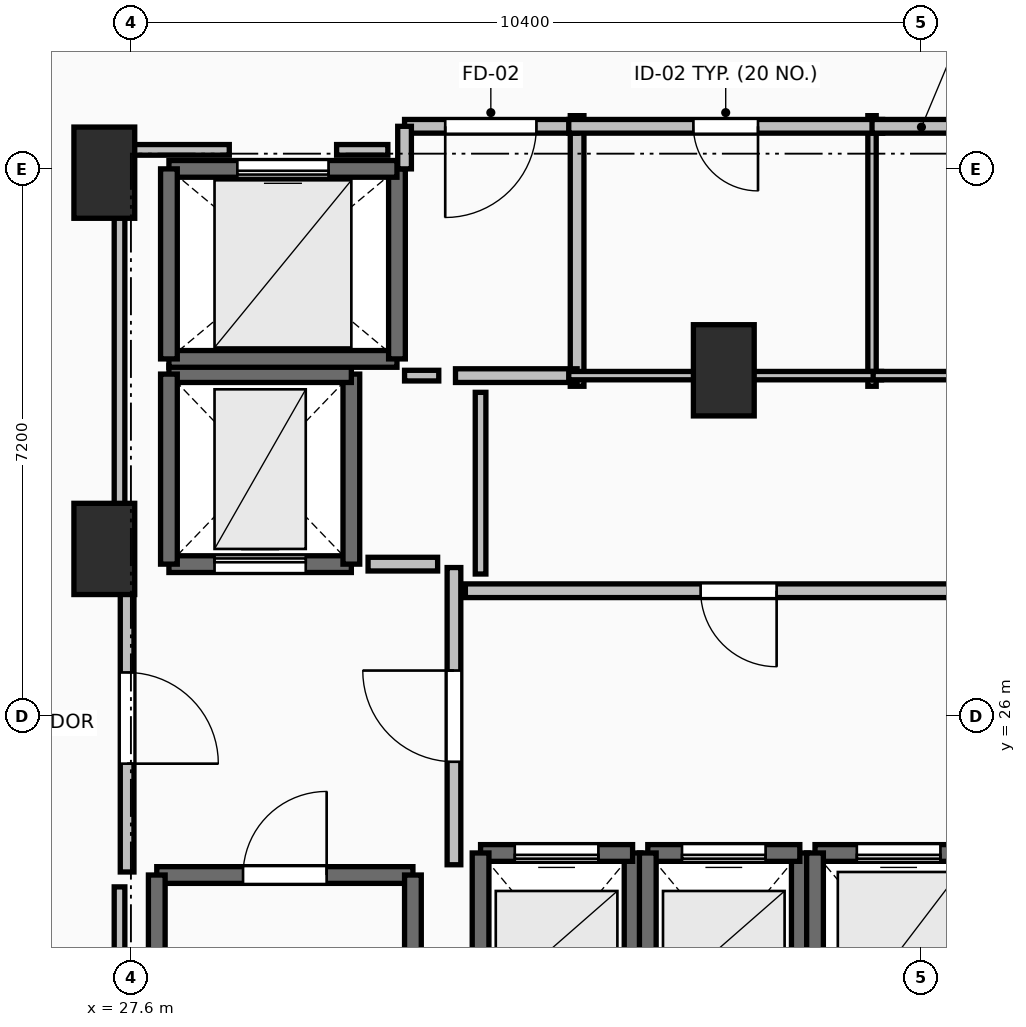
"""IFC4 building model, lengths in metres.
Left out: names, types, materials, properties, quantities, classifications, styles, units other than length and angle.
Written with IfcOpenShell. Run it as: python <this file> out.ifc"""

import sys

from ifc_helpers import new_model, si_unit, direction, frame, frame_2d, origin, origin_2d, place, context, subcontext, project, spatial, rectangle, extrude, element, fill, save


model = new_model("IFC4")
c1 = context("Model", 3, precision=1e-05, world=origin(), true_north=direction((0.0, 1.0)))
c2 = subcontext(c1, "Body", "Model", "MODEL_VIEW")
j1 = project(units=[si_unit("LENGTHUNIT", "METRE"), si_unit("PLANEANGLEUNIT", "RADIAN")], contexts=[c1])
p1 = place(None, origin())
s1 = spatial("IfcSite", under=j1, at=p1, CompositionType="ELEMENT")
p2 = place(p1, origin())
s2 = spatial("IfcBuilding", under=s1, at=p2, CompositionType="ELEMENT")
p3 = place(p2, frame((0.0, 0.0, 150.1)))
s3 = spatial("IfcBuildingStorey", under=s2, at=p3, CompositionType="ELEMENT", Elevation=150.1)
for number, where, z_axis, x_axis in (
    (1, (27.25, 28.2, 0.0), (0.0, 0.0, 1.0), (1.0, 0.0, 0.0)),
    (2, (27.25, 33.15, 0.0), (0.0, 0.0, 1.0), (1.0, 0.0, 0.0)),
    (3, (35.4, 30.55, 0.0), (0.0, 0.0, 1.0), (1.0, 0.0, 0.0)),
):
    element("IfcColumn", number, at=place(p3, frame(where, z_axis=z_axis, x_axis=x_axis)), inside=s3, PredefinedType="PILASTER", context=c2, shape_type="SweptSolid", body=[
        extrude(rectangle(XDim=0.8, YDim=1.2, at=origin_2d()), origin(), (0.0, 0.0, 1.0), 3.5),
    ])
p4 = place(p3, frame((27.94, 23.91, 0.0), z_axis=(0.0, 0.0, 1.0), x_axis=(1.0, 0.0, 0.0)))
e4 = element("IfcWall", 4, at=p4, inside=s3, PredefinedType="SOLIDWALL", context=c2, shape_type="SweptSolid", body=[
    extrude(rectangle(XDim=3.37, YDim=0.22, at=frame_2d((1.685, 0.0))), origin(), (0.0, 0.0, 1.0), 3.24),
])
p5 = place(p4, frame((1.135, 0.0, 0.0)))
e5 = element("IfcOpeningElement", 5, at=p5, cuts=e4, PredefinedType="OPENING", context=c2, shape_type="SweptSolid", body=[
    extrude(rectangle(XDim=1.1, YDim=2.15, at=frame_2d((0.55, 1.075))), frame((0.0, 0.125, 0.0), z_axis=(0.0, -1.0, 0.0), x_axis=(1.0, 0.0, 0.0)), (0.0, 0.0, 1.0), 0.25),
])
for number, where, z_axis, x_axis in (
    (6, (31.31, 23.91, 0.0), (0.0, 0.0, 1.0), (0.0, -1.0, 0.0)),
    (7, (27.94, 16.49, 0.0), (0.0, 0.0, 1.0), (0.0, 1.0, 0.0)),
):
    element("IfcWall", number, at=place(p3, frame(where, z_axis=z_axis, x_axis=x_axis)), inside=s3, PredefinedType="SOLIDWALL", context=c2, shape_type="SweptSolid", body=[
        extrude(rectangle(XDim=7.42, YDim=0.22, at=frame_2d((3.71, 0.0))), origin(), (0.0, 0.0, 1.0), 3.24),
    ])
p6 = place(p3, frame((34.2, 21.8, 0.0), z_axis=(0.0, 0.0, 1.0), x_axis=(0.0, 1.0, 0.0)))
e8 = element("IfcWall", 8, at=p6, inside=s3, PredefinedType="SOLIDWALL", context=c2, shape_type="SweptSolid", body=[
    extrude(rectangle(XDim=2.4, YDim=0.22, at=frame_2d((1.2, 0.0))), origin(), (0.0, 0.0, 1.0), 3.24),
])
p7 = place(p3, frame((34.2, 24.2, 0.0), z_axis=(0.0, 0.0, 1.0), x_axis=(-1.0, 0.0, 0.0)))
e9 = element("IfcWall", 9, at=p7, inside=s3, PredefinedType="SOLIDWALL", context=c2, shape_type="SweptSolid", body=[
    extrude(rectangle(XDim=2.0, YDim=0.22, at=frame_2d((1.0, 0.0))), origin(), (0.0, 0.0, 1.0), 3.24),
])
p8 = place(p7, frame((0.45, 0.0, 0.0)))
e10 = element("IfcOpeningElement", 10, at=p8, cuts=e9, PredefinedType="OPENING", context=c2, shape_type="SweptSolid", body=[
    extrude(rectangle(XDim=1.1, YDim=2.2, at=frame_2d((0.55, 1.1))), frame((0.0, 0.125, 0.0), z_axis=(0.0, -1.0, 0.0), x_axis=(1.0, 0.0, 0.0)), (0.0, 0.0, 1.0), 0.25),
])
for number, where, z_axis, x_axis in (
    (11, (32.2, 24.2, 0.0), (0.0, 0.0, 1.0), (0.0, -1.0, 0.0)),
    (12, (36.4, 21.8, 0.0), (0.0, 0.0, 1.0), (0.0, 1.0, 0.0)),
):
    element("IfcWall", number, at=place(p3, frame(where, z_axis=z_axis, x_axis=x_axis)), inside=s3, PredefinedType="SOLIDWALL", context=c2, shape_type="SweptSolid", body=[
        extrude(rectangle(XDim=2.4, YDim=0.22, at=frame_2d((1.2, 0.0))), origin(), (0.0, 0.0, 1.0), 3.24),
    ])
p9 = place(p3, frame((36.4, 24.2, 0.0), z_axis=(0.0, 0.0, 1.0), x_axis=(-1.0, 0.0, 0.0)))
e13 = element("IfcWall", 13, at=p9, inside=s3, PredefinedType="SOLIDWALL", context=c2, shape_type="SweptSolid", body=[
    extrude(rectangle(XDim=2.0, YDim=0.22, at=frame_2d((1.0, 0.0))), origin(), (0.0, 0.0, 1.0), 3.24),
])
p10 = place(p9, frame((0.45, 0.0, 0.0)))
e14 = element("IfcOpeningElement", 14, at=p10, cuts=e13, PredefinedType="OPENING", context=c2, shape_type="SweptSolid", body=[
    extrude(rectangle(XDim=1.1, YDim=2.2, at=frame_2d((0.55, 1.1))), frame((0.0, 0.125, 0.0), z_axis=(0.0, -1.0, 0.0), x_axis=(1.0, 0.0, 0.0)), (0.0, 0.0, 1.0), 0.25),
])
p11 = place(p3, frame((34.4, 24.2, 0.0), z_axis=(0.0, 0.0, 1.0), x_axis=(0.0, -1.0, 0.0)))
e15 = element("IfcWall", 15, at=p11, inside=s3, PredefinedType="SOLIDWALL", context=c2, shape_type="SweptSolid", body=[
    extrude(rectangle(XDim=2.4, YDim=0.22, at=frame_2d((1.2, 0.0))), origin(), (0.0, 0.0, 1.0), 3.24),
])
p12 = place(p3, frame((38.8, 24.2, 0.0), z_axis=(0.0, 0.0, 1.0), x_axis=(-1.0, 0.0, 0.0)))
e16 = element("IfcWall", 16, at=p12, inside=s3, PredefinedType="SOLIDWALL", context=c2, shape_type="SweptSolid", body=[
    extrude(rectangle(XDim=2.2, YDim=0.22, at=frame_2d((1.1, 0.0))), origin(), (0.0, 0.0, 1.0), 3.24),
])
p13 = place(p12, frame((0.55, 0.0, 0.0)))
e17 = element("IfcOpeningElement", 17, at=p13, cuts=e16, PredefinedType="OPENING", context=c2, shape_type="SweptSolid", body=[
    extrude(rectangle(XDim=1.1, YDim=2.2, at=frame_2d((0.55, 1.1))), frame((0.0, 0.125, 0.0), z_axis=(0.0, -1.0, 0.0), x_axis=(1.0, 0.0, 0.0)), (0.0, 0.0, 1.0), 0.25),
])
p14 = place(p3, frame((36.6, 24.2, 0.0), z_axis=(0.0, 0.0, 1.0), x_axis=(0.0, -1.0, 0.0)))
e18 = element("IfcWall", 18, at=p14, inside=s3, PredefinedType="SOLIDWALL", context=c2, shape_type="SweptSolid", body=[
    extrude(rectangle(XDim=2.6, YDim=0.22, at=frame_2d((1.3, 0.0))), origin(), (0.0, 0.0, 1.0), 3.24),
])
p15 = place(p3, frame((28.1, 28.0, 0.0), z_axis=(0.0, 0.0, 1.0), x_axis=(1.0, 0.0, 0.0)))
e19 = element("IfcWall", 19, at=p15, inside=s3, PredefinedType="SHEAR", context=c2, shape_type="SweptSolid", body=[
    extrude(rectangle(XDim=2.4, YDim=0.22, at=frame_2d((1.2, 0.0))), origin(), (0.0, 0.0, 1.0), 3.24),
])
p16 = place(p15, frame((0.6, 0.0, 0.0)))
e20 = element("IfcOpeningElement", 20, at=p16, cuts=e19, PredefinedType="OPENING", context=c2, shape_type="SweptSolid", body=[
    extrude(rectangle(XDim=1.2, YDim=2.2, at=frame_2d((0.6, 1.1))), frame((0.0, 0.125, 0.0), z_axis=(0.0, -1.0, 0.0), x_axis=(1.0, 0.0, 0.0)), (0.0, 0.0, 1.0), 0.25),
])
p17 = place(p3, frame((30.5, 28.0, 0.0), z_axis=(0.0, 0.0, 1.0), x_axis=(0.0, 1.0, 0.0)))
e21 = element("IfcWall", 21, at=p17, inside=s3, PredefinedType="SHEAR", context=c2, shape_type="SweptSolid", body=[
    extrude(rectangle(XDim=2.5, YDim=0.22, at=frame_2d((1.25, 0.0))), origin(), (0.0, 0.0, 1.0), 3.24),
])
p18 = place(p3, frame((30.5, 30.5, 0.0), z_axis=(0.0, 0.0, 1.0), x_axis=(-1.0, 0.0, 0.0)))
e22 = element("IfcWall", 22, at=p18, inside=s3, PredefinedType="SHEAR", context=c2, shape_type="SweptSolid", body=[
    extrude(rectangle(XDim=2.4, YDim=0.22, at=frame_2d((1.2, 0.0))), origin(), (0.0, 0.0, 1.0), 3.24),
])
p19 = place(p3, frame((28.1, 30.5, 0.0), z_axis=(0.0, 0.0, 1.0), x_axis=(0.0, -1.0, 0.0)))
e23 = element("IfcWall", 23, at=p19, inside=s3, PredefinedType="SHEAR", context=c2, shape_type="SweptSolid", body=[
    extrude(rectangle(XDim=2.5, YDim=0.22, at=frame_2d((1.25, 0.0))), origin(), (0.0, 0.0, 1.0), 3.24),
])
p20 = place(p3, frame((28.1, 30.7, 0.0), z_axis=(0.0, 0.0, 1.0), x_axis=(1.0, 0.0, 0.0)))
e24 = element("IfcWall", 24, at=p20, inside=s3, PredefinedType="SOLIDWALL", context=c2, shape_type="SweptSolid", body=[
    extrude(rectangle(XDim=3.0, YDim=0.22, at=frame_2d((1.5, 0.0))), origin(), (0.0, 0.0, 1.0), 3.24),
])
p21 = place(p3, frame((31.1, 30.7, 0.0), z_axis=(0.0, 0.0, 1.0), x_axis=(0.0, 1.0, 0.0)))
e25 = element("IfcWall", 25, at=p21, inside=s3, PredefinedType="SOLIDWALL", context=c2, shape_type="SweptSolid", body=[
    extrude(rectangle(XDim=2.5, YDim=0.22, at=frame_2d((1.25, 0.0))), origin(), (0.0, 0.0, 1.0), 3.24),
])
p22 = place(p3, frame((31.1, 33.2, 0.0), z_axis=(0.0, 0.0, 1.0), x_axis=(-1.0, 0.0, 0.0)))
e26 = element("IfcWall", 26, at=p22, inside=s3, PredefinedType="SOLIDWALL", context=c2, shape_type="SweptSolid", body=[
    extrude(rectangle(XDim=3.0, YDim=0.22, at=frame_2d((1.5, 0.0))), origin(), (0.0, 0.0, 1.0), 3.24),
])
p23 = place(p22, frame((0.9, 0.0, 0.0)))
e27 = element("IfcOpeningElement", 27, at=p23, cuts=e26, PredefinedType="OPENING", context=c2, shape_type="SweptSolid", body=[
    extrude(rectangle(XDim=1.2, YDim=2.2, at=frame_2d((0.6, 1.1))), frame((0.0, 0.125, 0.0), z_axis=(0.0, -1.0, 0.0), x_axis=(1.0, 0.0, 0.0)), (0.0, 0.0, 1.0), 0.25),
])
p24 = place(p3, frame((28.1, 33.2, 0.0), z_axis=(0.0, 0.0, 1.0), x_axis=(0.0, -1.0, 0.0)))
e28 = element("IfcWall", 28, at=p24, inside=s3, PredefinedType="SOLIDWALL", context=c2, shape_type="SweptSolid", body=[
    extrude(rectangle(XDim=2.5, YDim=0.22, at=frame_2d((1.25, 0.0))), origin(), (0.0, 0.0, 1.0), 3.24),
])
p25 = place(p3, frame((31.85, 24.045, 0.0), z_axis=(0.0, 0.0, 1.0), x_axis=(0.0, 1.0, 0.0)))
e29 = element("IfcWall", 29, at=p25, inside=s3, PredefinedType="PARTITIONING", context=c2, shape_type="SweptSolid", body=[
    extrude(rectangle(XDim=3.91, YDim=0.18, at=frame_2d((1.955, 0.0))), origin(), (0.0, 0.0, 1.0), 3.24),
])
p26 = place(p25, frame((1.355, 0.0, 0.0)))
e30 = element("IfcOpeningElement", 30, at=p26, cuts=e29, PredefinedType="OPENING", context=c2, shape_type="SweptSolid", body=[
    extrude(rectangle(XDim=1.2, YDim=2.15, at=frame_2d((0.6, 1.075))), frame((0.0, 0.105, 0.0), z_axis=(0.0, -1.0, 0.0), x_axis=(1.0, 0.0, 0.0)), (0.0, 0.0, 1.0), 0.21),
])
p27 = place(p3, frame((27.55, 28.0, 0.0), z_axis=(0.0, 0.0, 1.0), x_axis=(0.0, -1.0, 0.0)))
e31 = element("IfcWall", 31, at=p27, inside=s3, PredefinedType="PARTITIONING", context=c2, shape_type="SweptSolid", body=[
    extrude(rectangle(XDim=4.05, YDim=0.18, at=frame_2d((2.025, 0.0))), origin(), (0.0, 0.0, 1.0), 3.24),
])
p28 = place(p27, frame((1.425, 0.0, 0.0)))
e32 = element("IfcOpeningElement", 32, at=p28, cuts=e31, PredefinedType="OPENING", context=c2, shape_type="SweptSolid", body=[
    extrude(rectangle(XDim=1.2, YDim=2.15, at=frame_2d((0.6, 1.075))), frame((0.0, 0.105, 0.0), z_axis=(0.0, -1.0, 0.0), x_axis=(1.0, 0.0, 0.0)), (0.0, 0.0, 1.0), 0.21),
])
p29 = place(p3, frame((33.47, 30.34, 0.0), z_axis=(0.0, 0.0, 1.0), x_axis=(0.0, 1.0, 0.0)))
e33 = element("IfcWall", 33, at=p29, inside=s3, PredefinedType="PARTITIONING", context=c2, shape_type="SweptSolid", body=[
    extrude(rectangle(XDim=3.56, YDim=0.18, at=frame_2d((1.78, 0.0))), origin(), (0.0, 0.0, 1.0), 3.24),
])
p30 = place(p3, frame((31.87, 30.48, 0.0), z_axis=(0.0, 0.0, 1.0), x_axis=(1.0, 0.0, 0.0)))
e34 = element("IfcWall", 34, at=p30, inside=s3, PredefinedType="PARTITIONING", context=c2, shape_type="SweptSolid", body=[
    extrude(rectangle(XDim=1.6, YDim=0.18, at=frame_2d((0.8, 0.0))), origin(), (0.0, 0.0, 1.0), 3.24),
])
p31 = place(p3, frame((33.47, 33.76, 0.0), z_axis=(0.0, 0.0, 1.0), x_axis=(-1.0, 0.0, 0.0)))
e35 = element("IfcWall", 35, at=p31, inside=s3, PredefinedType="PARTITIONING", context=c2, shape_type="SweptSolid", body=[
    extrude(rectangle(XDim=2.27, YDim=0.18, at=frame_2d((1.135, 0.0))), origin(), (0.0, 0.0, 1.0), 3.24),
])
p32 = place(p31, frame((0.535, 0.0, 0.0)))
e36 = element("IfcOpeningElement", 36, at=p32, cuts=e35, PredefinedType="OPENING", context=c2, shape_type="SweptSolid", body=[
    extrude(rectangle(XDim=1.2, YDim=2.15, at=frame_2d((0.6, 1.075))), frame((0.0, 0.105, 0.0), z_axis=(0.0, -1.0, 0.0), x_axis=(1.0, 0.0, 0.0)), (0.0, 0.0, 1.0), 0.21),
])
p33 = place(p3, frame((31.2, 33.76, 0.0), z_axis=(0.0, 0.0, 1.0), x_axis=(0.0, -1.0, 0.0)))
e37 = element("IfcWall", 37, at=p33, inside=s3, PredefinedType="PARTITIONING", context=c2, shape_type="SweptSolid", body=[
    extrude(rectangle(XDim=0.56, YDim=0.18, at=frame_2d((0.28, 0.0))), origin(), (0.0, 0.0, 1.0), 3.24),
])
p34 = place(p3, frame((39.19, 27.65, 0.0), z_axis=(0.0, 0.0, 1.0), x_axis=(-1.0, 0.0, 0.0)))
e38 = element("IfcWall", 38, at=p34, inside=s3, PredefinedType="PARTITIONING", context=c2, shape_type="SweptSolid", body=[
    extrude(rectangle(XDim=7.19, YDim=0.18, at=frame_2d((3.595, 0.0))), origin(), (0.0, 0.0, 1.0), 3.24),
])
p35 = place(p34, frame((3.095, 0.0, 0.0)))
e39 = element("IfcOpeningElement", 39, at=p35, cuts=e38, PredefinedType="OPENING", context=c2, shape_type="SweptSolid", body=[
    extrude(rectangle(XDim=1.0, YDim=2.15, at=frame_2d((0.5, 1.075))), frame((0.0, 0.105, 0.0), z_axis=(0.0, -1.0, 0.0), x_axis=(1.0, 0.0, 0.0)), (0.0, 0.0, 1.0), 0.21),
])
p36 = place(p3, frame((37.35, 30.34, 0.0), z_axis=(0.0, 0.0, 1.0), x_axis=(0.0, 1.0, 0.0)))
e40 = element("IfcWall", 40, at=p36, inside=s3, PredefinedType="PARTITIONING", context=c2, shape_type="SweptSolid", body=[
    extrude(rectangle(XDim=3.56, YDim=0.11, at=frame_2d((1.78, 0.0))), origin(), (0.0, 0.0, 1.0), 2.432),
])
p37 = place(p3, frame((33.36, 30.48, 0.0), z_axis=(0.0, 0.0, 1.0), x_axis=(1.0, 0.0, 0.0)))
e41 = element("IfcWall", 41, at=p37, inside=s3, PredefinedType="PARTITIONING", context=c2, shape_type="SweptSolid", body=[
    extrude(rectangle(XDim=4.115, YDim=0.11, at=frame_2d((2.058, 0.0))), origin(), (0.0, 0.0, 1.0), 2.432),
])
p38 = place(p3, frame((37.49, 33.76, 0.0), z_axis=(0.0, 0.0, 1.0), x_axis=(-1.0, 0.0, 0.0)))
e42 = element("IfcWall", 42, at=p38, inside=s3, PredefinedType="PARTITIONING", context=c2, shape_type="SweptSolid", body=[
    extrude(rectangle(XDim=4.13, YDim=0.18, at=frame_2d((2.065, 0.0))), origin(), (0.0, 0.0, 1.0), 3.24),
])
p39 = place(p38, frame((1.64, 0.0, 0.0)))
e43 = element("IfcOpeningElement", 43, at=p39, cuts=e42, PredefinedType="OPENING", context=c2, shape_type="SweptSolid", body=[
    extrude(rectangle(XDim=0.85, YDim=2.1, at=frame_2d((0.425, 1.05))), frame((0.0, 0.105, 0.0), z_axis=(0.0, -1.0, 0.0), x_axis=(1.0, 0.0, 0.0)), (0.0, 0.0, 1.0), 0.21),
])
p40 = place(p3, frame((37.365, 30.48, 0.0), z_axis=(0.0, 0.0, 1.0), x_axis=(1.0, 0.0, 0.0)))
e44 = element("IfcWall", 44, at=p40, inside=s3, PredefinedType="PARTITIONING", context=c2, shape_type="SweptSolid", body=[
    extrude(rectangle(XDim=1.955, YDim=0.11, at=frame_2d((0.978, 0.0))), origin(), (0.0, 0.0, 1.0), 2.432),
])
p41 = place(p3, frame((44.26, 33.76, 0.0), z_axis=(0.0, 0.0, 1.0), x_axis=(-1.0, 0.0, 0.0)))
e45 = element("IfcWall", 45, at=p41, inside=s3, PredefinedType="PARTITIONING", context=c2, shape_type="SweptSolid", body=[
    extrude(rectangle(XDim=6.91, YDim=0.18, at=frame_2d((3.455, 0.0))), origin(), (0.0, 0.0, 1.0), 3.24),
])
p42 = place(p41, frame((3.03, 0.0, 0.0)))
e46 = element("IfcOpeningElement", 46, at=p42, cuts=e45, PredefinedType="OPENING", context=c2, shape_type="SweptSolid", body=[
    extrude(rectangle(XDim=0.85, YDim=2.1, at=frame_2d((0.425, 1.05))), frame((0.0, 0.105, 0.0), z_axis=(0.0, -1.0, 0.0), x_axis=(1.0, 0.0, 0.0)), (0.0, 0.0, 1.0), 0.21),
])
p43 = place(p3, frame((31.635, 28.0, 0.0), z_axis=(0.0, 0.0, 1.0), x_axis=(-1.0, 0.0, 0.0)))
e47 = element("IfcWall", 47, at=p43, inside=s3, PredefinedType="PARTITIONING", context=c2, shape_type="SweptSolid", body=[
    extrude(rectangle(XDim=0.915, YDim=0.18, at=frame_2d((0.458, 0.0))), origin(), (0.0, 0.0, 1.0), 3.24),
])
p44 = place(p3, frame((31.2, 30.48, 0.0), z_axis=(0.0, 0.0, 1.0), x_axis=(1.0, 0.0, 0.0)))
e48 = element("IfcWall", 48, at=p44, inside=s3, PredefinedType="PARTITIONING", context=c2, shape_type="SweptSolid", body=[
    extrude(rectangle(XDim=0.45, YDim=0.14, at=frame_2d((0.225, 0.0))), origin(), (0.0, 0.0, 1.0), 3.24),
])
p45 = place(p3, frame((32.2, 30.26, 0.0), z_axis=(0.0, 0.0, 1.0), x_axis=(0.0, -1.0, 0.0)))
e49 = element("IfcWall", 49, at=p45, inside=s3, PredefinedType="PARTITIONING", context=c2, shape_type="SweptSolid", body=[
    extrude(rectangle(XDim=2.39, YDim=0.14, at=frame_2d((1.195, 0.0))), origin(), (0.0, 0.0, 1.0), 3.24),
])
p46 = place(p3, frame((30.98, 33.45, 0.0), z_axis=(0.0, 0.0, 1.0), x_axis=(-1.0, 0.0, 0.0)))
e50 = element("IfcWall", 50, at=p46, inside=s3, PredefinedType="PARTITIONING", context=c2, shape_type="SweptSolid", body=[
    extrude(rectangle(XDim=0.674, YDim=0.14, at=frame_2d((0.337, 0.0))), origin(), (0.0, 0.0, 1.0), 3.24),
])
p47 = place(p3, frame((28.894, 33.45, 0.0), z_axis=(0.0, 0.0, 1.0), x_axis=(-1.0, 0.0, 0.0)))
e51 = element("IfcWall", 51, at=p47, inside=s3, PredefinedType="PARTITIONING", context=c2, shape_type="SweptSolid", body=[
    extrude(rectangle(XDim=1.444, YDim=0.14, at=frame_2d((0.722, 0.0))), origin(), (0.0, 0.0, 1.0), 2.432),
])
p48 = place(p3, frame((27.45, 33.45, 0.0), z_axis=(0.0, 0.0, 1.0), x_axis=(0.0, -1.0, 0.0)))
e52 = element("IfcWall", 52, at=p48, inside=s3, PredefinedType="PARTITIONING", context=c2, shape_type="SweptSolid", body=[
    extrude(rectangle(XDim=5.254, YDim=0.14, at=frame_2d((2.627, 0.0))), origin(), (0.0, 0.0, 1.0), 2.432),
])
p49 = place(p3, frame((27.45, 23.754, 0.0), z_axis=(0.0, 0.0, 1.0), x_axis=(0.0, -1.0, 0.0)))
e53 = element("IfcWall", 53, at=p49, inside=s3, PredefinedType="PARTITIONING", context=c2, shape_type="SweptSolid", body=[
    extrude(rectangle(XDim=7.514, YDim=0.14, at=frame_2d((3.757, 0.0))), origin(), (0.0, 0.0, 1.0), 2.432),
])
p50 = place(p5, origin())
e54 = element("IfcDoor", 54, at=p50, inside=s3, OperationType="SINGLE_SWING_RIGHT", PredefinedType="DOOR", context=c2, shape_type="SweptSolid", body=[
    extrude(rectangle(XDim=1.1, YDim=2.15, at=frame_2d((0.55, 1.075))), frame((0.0, 0.025, 0.0), z_axis=(0.0, -1.0, 0.0), x_axis=(1.0, 0.0, 0.0)), (0.0, 0.0, 1.0), 0.05),
])
fill(e5, e54)
p51 = place(p8, origin())
e55 = element("IfcDoor", 55, at=p51, inside=s3, OperationType="SLIDING_TO_LEFT", PredefinedType="DOOR", context=c2, shape_type="SweptSolid", body=[
    extrude(rectangle(XDim=1.1, YDim=2.2, at=frame_2d((0.55, 1.1))), frame((0.0, 0.025, 0.0), z_axis=(0.0, -1.0, 0.0), x_axis=(1.0, 0.0, 0.0)), (0.0, 0.0, 1.0), 0.05),
])
fill(e10, e55)
p52 = place(p10, origin())
e56 = element("IfcDoor", 56, at=p52, inside=s3, OperationType="SLIDING_TO_LEFT", PredefinedType="DOOR", context=c2, shape_type="SweptSolid", body=[
    extrude(rectangle(XDim=1.1, YDim=2.2, at=frame_2d((0.55, 1.1))), frame((0.0, 0.025, 0.0), z_axis=(0.0, -1.0, 0.0), x_axis=(1.0, 0.0, 0.0)), (0.0, 0.0, 1.0), 0.05),
])
fill(e14, e56)
p53 = place(p13, origin())
e57 = element("IfcDoor", 57, at=p53, inside=s3, OperationType="SLIDING_TO_LEFT", PredefinedType="DOOR", context=c2, shape_type="SweptSolid", body=[
    extrude(rectangle(XDim=1.1, YDim=2.2, at=frame_2d((0.55, 1.1))), frame((0.0, 0.025, 0.0), z_axis=(0.0, -1.0, 0.0), x_axis=(1.0, 0.0, 0.0)), (0.0, 0.0, 1.0), 0.05),
])
fill(e17, e57)
p54 = place(p16, origin())
e58 = element("IfcDoor", 58, at=p54, inside=s3, OperationType="SLIDING_TO_LEFT", PredefinedType="DOOR", context=c2, shape_type="SweptSolid", body=[
    extrude(rectangle(XDim=1.2, YDim=2.2, at=frame_2d((0.6, 1.1))), frame((0.0, 0.025, 0.0), z_axis=(0.0, -1.0, 0.0), x_axis=(1.0, 0.0, 0.0)), (0.0, 0.0, 1.0), 0.05),
])
fill(e20, e58)
p55 = place(p23, origin())
e59 = element("IfcDoor", 59, at=p55, inside=s3, OperationType="SLIDING_TO_LEFT", PredefinedType="DOOR", context=c2, shape_type="SweptSolid", body=[
    extrude(rectangle(XDim=1.2, YDim=2.2, at=frame_2d((0.6, 1.1))), frame((0.0, 0.025, 0.0), z_axis=(0.0, -1.0, 0.0), x_axis=(1.0, 0.0, 0.0)), (0.0, 0.0, 1.0), 0.05),
])
fill(e27, e59)
p56 = place(p26, origin())
e60 = element("IfcDoor", 60, at=p56, inside=s3, OperationType="SINGLE_SWING_RIGHT", PredefinedType="DOOR", context=c2, shape_type="SweptSolid", body=[
    extrude(rectangle(XDim=1.2, YDim=2.15, at=frame_2d((0.6, 1.075))), frame((0.0, 0.025, 0.0), z_axis=(0.0, -1.0, 0.0), x_axis=(1.0, 0.0, 0.0)), (0.0, 0.0, 1.0), 0.05),
])
fill(e30, e60)
p57 = place(p28, origin())
e61 = element("IfcDoor", 61, at=p57, inside=s3, OperationType="SINGLE_SWING_RIGHT", PredefinedType="DOOR", context=c2, shape_type="SweptSolid", body=[
    extrude(rectangle(XDim=1.2, YDim=2.15, at=frame_2d((0.6, 1.075))), frame((0.0, 0.025, 0.0), z_axis=(0.0, -1.0, 0.0), x_axis=(1.0, 0.0, 0.0)), (0.0, 0.0, 1.0), 0.05),
])
fill(e32, e61)
p58 = place(p32, origin())
e62 = element("IfcDoor", 62, at=p58, inside=s3, OperationType="SINGLE_SWING_RIGHT", PredefinedType="DOOR", context=c2, shape_type="SweptSolid", body=[
    extrude(rectangle(XDim=1.2, YDim=2.15, at=frame_2d((0.6, 1.075))), frame((0.0, 0.025, 0.0), z_axis=(0.0, -1.0, 0.0), x_axis=(1.0, 0.0, 0.0)), (0.0, 0.0, 1.0), 0.05),
])
fill(e36, e62)
p59 = place(p35, origin())
e63 = element("IfcDoor", 63, at=p59, inside=s3, OperationType="SINGLE_SWING_LEFT", PredefinedType="DOOR", context=c2, shape_type="SweptSolid", body=[
    extrude(rectangle(XDim=1.0, YDim=2.15, at=frame_2d((0.5, 1.075))), frame((0.0, 0.025, 0.0), z_axis=(0.0, -1.0, 0.0), x_axis=(1.0, 0.0, 0.0)), (0.0, 0.0, 1.0), 0.05),
])
fill(e39, e63)
p60 = place(p39, origin())
e64 = element("IfcDoor", 64, at=p60, inside=s3, OperationType="SINGLE_SWING_LEFT", PredefinedType="DOOR", context=c2, shape_type="SweptSolid", body=[
    extrude(rectangle(XDim=0.85, YDim=2.1, at=frame_2d((0.425, 1.05))), frame((0.0, 0.025, 0.0), z_axis=(0.0, -1.0, 0.0), x_axis=(1.0, 0.0, 0.0)), (0.0, 0.0, 1.0), 0.05),
])
fill(e43, e64)
save(model, sys.argv[1])
